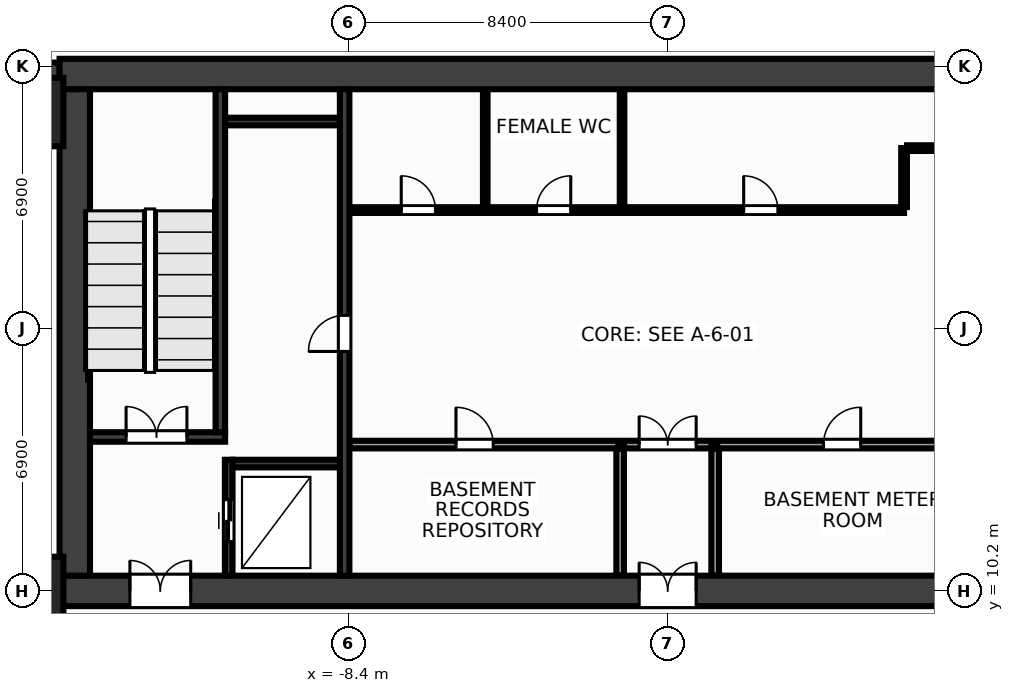
"""IFC4 building model, lengths in metres.
Left out: names, types, materials, properties, quantities, classifications, styles, units other than length and angle.
Written with IfcOpenShell. Run it as: python <this file> out.ifc"""

import sys

from ifc_helpers import new_model, si_unit, direction, frame, frame_2d, origin, origin_2d, place, context, subcontext, project, spatial, rectangle, extrude, source, transform, mapped, element, fill, save


model = new_model("IFC4")
c1 = context("Model", 3, precision=1e-05, world=origin(), true_north=direction((0.0, 1.0)))
c2 = subcontext(c1, "Body", "Model", "MODEL_VIEW")
j1 = project(units=[si_unit("LENGTHUNIT", "METRE"), si_unit("PLANEANGLEUNIT", "RADIAN")], contexts=[c1])
p1 = place(None, origin())
s1 = spatial("IfcSite", under=j1, at=p1, CompositionType="ELEMENT")
p2 = place(p1, origin())
s2 = spatial("IfcBuilding", under=s1, at=p2, CompositionType="ELEMENT")
p3 = place(p2, frame((0.0, 0.0, -11.0)))
s3 = spatial("IfcBuildingStorey", under=s2, at=p3, CompositionType="ELEMENT", Elevation=-11.0)
m1 = source(origin(), c2, "Body", "SweptSolid", [
    extrude(rectangle(XDim=22.9, YDim=0.6, at=frame_2d((11.45, 0.0))), origin(), (0.0, 0.0, 1.0), 5.5),
])
p4 = place(p3, frame((-38.9, 23.8, 0.0), z_axis=(0.0, 0.0, 1.0), x_axis=(1.0, 0.0, 0.0)))
e1 = element("IfcWall", 1, at=p4, inside=s3, PredefinedType="SHEAR", context=c2, shape_type="MappedRepresentation", body=[
    mapped(m1, transform((0.0, 0.0, 0.0), x_axis=(1.0, 0.0, 0.0), y_axis=(0.0, 1.0, 0.0), z_axis=(0.0, 0.0, 1.0), scale=1.0)),
])
m2 = source(origin(), c2, "Body", "SweptSolid", [
    extrude(rectangle(XDim=32.0, YDim=0.8, at=frame_2d((16.0, 0.0))), origin(), (0.0, 0.0, 1.0), 5.5),
])
p5 = place(p3, frame((-16.0, 23.8, 0.0), z_axis=(0.0, 0.0, 1.0), x_axis=(1.0, 0.0, 0.0)))
e2 = element("IfcWall", 2, at=p5, inside=s3, PredefinedType="SHEAR", context=c2, shape_type="MappedRepresentation", body=[
    mapped(m2, transform((0.0, 0.0, 0.0), x_axis=(1.0, 0.0, 0.0), y_axis=(0.0, 1.0, 0.0), z_axis=(0.0, 0.0, 1.0), scale=1.0)),
])
p6 = place(p3, frame((-16.0, 10.2, 0.0), z_axis=(0.0, 0.0, 1.0), x_axis=(1.0, 0.0, 0.0)))
e3 = element("IfcWall", 3, at=p6, inside=s3, PredefinedType="SHEAR", context=c2, shape_type="MappedRepresentation", body=[
    mapped(m2, transform((0.0, 0.0, 0.0), x_axis=(1.0, 0.0, 0.0), y_axis=(0.0, 1.0, 0.0), z_axis=(0.0, 0.0, 1.0), scale=1.0)),
])
p7 = place(p6, frame((1.85, 0.0, 0.0)))
e4 = element("IfcOpeningElement", 4, at=p7, cuts=e3, PredefinedType="OPENING", context=c2, shape_type="SweptSolid", body=[
    extrude(rectangle(XDim=1.6, YDim=2.15, at=frame_2d((0.8, 1.075))), frame((0.0, 0.412, 0.0), z_axis=(0.0, -1.0, 0.0), x_axis=(1.0, 0.0, 0.0)), (0.0, 0.0, 1.0), 0.824),
])
p8 = place(p6, frame((28.55, 0.0, 0.0)))
e5 = element("IfcOpeningElement", 5, at=p8, cuts=e3, PredefinedType="OPENING", context=c2, shape_type="SweptSolid", body=[
    extrude(rectangle(XDim=1.6, YDim=2.15, at=frame_2d((0.8, 1.075))), frame((0.0, 0.412, 0.0), z_axis=(0.0, -1.0, 0.0), x_axis=(1.0, 0.0, 0.0)), (0.0, 0.0, 1.0), 0.824),
])
p9 = place(p6, frame((15.25, 0.0, 0.0)))
e6 = element("IfcOpeningElement", 6, at=p9, cuts=e3, PredefinedType="OPENING", context=c2, shape_type="SweptSolid", body=[
    extrude(rectangle(XDim=1.5, YDim=2.2, at=frame_2d((0.75, 1.1))), frame((0.0, 0.412, 0.0), z_axis=(0.0, -1.0, 0.0), x_axis=(1.0, 0.0, 0.0)), (0.0, 0.0, 1.0), 0.824),
])
m3 = source(origin(), c2, "Body", "SweptSolid", [
    extrude(rectangle(XDim=12.8, YDim=0.8, at=frame_2d((6.4, 0.0))), origin(), (0.0, 0.0, 1.0), 5.5),
])
p10 = place(p3, frame((-15.6, 10.6, 0.0), z_axis=(0.0, 0.0, 1.0), x_axis=(0.0, 1.0, 0.0)))
e7 = element("IfcWall", 7, at=p10, inside=s3, PredefinedType="SHEAR", context=c2, shape_type="MappedRepresentation", body=[
    mapped(m3, transform((0.0, 0.0, 0.0), x_axis=(1.0, 0.0, 0.0), y_axis=(0.0, 1.0, 0.0), z_axis=(0.0, 0.0, 1.0), scale=1.0)),
])
m4 = source(origin(), c2, "Body", "SweptSolid", [
    extrude(rectangle(XDim=12.8, YDim=0.25, at=frame_2d((6.4, 0.0))), origin(), (0.0, 0.0, 1.0), 5.5),
])
p11 = place(p3, frame((-8.5, 10.6, 0.0), z_axis=(0.0, 0.0, 1.0), x_axis=(0.0, 1.0, 0.0)))
e8 = element("IfcWall", 8, at=p11, inside=s3, PredefinedType="SHEAR", context=c2, shape_type="MappedRepresentation", body=[
    mapped(m4, transform((0.0, 0.0, 0.0), x_axis=(1.0, 0.0, 0.0), y_axis=(0.0, 1.0, 0.0), z_axis=(0.0, 0.0, 1.0), scale=1.0)),
])
p12 = place(p11, frame((5.9, 0.0, 0.0)))
e9 = element("IfcOpeningElement", 9, at=p12, cuts=e8, PredefinedType="OPENING", context=c2, shape_type="SweptSolid", body=[
    extrude(rectangle(XDim=0.95, YDim=2.15, at=frame_2d((0.475, 1.075))), frame((0.0, 0.137, 0.0), z_axis=(0.0, -1.0, 0.0), x_axis=(1.0, 0.0, 0.0)), (0.0, 0.0, 1.0), 0.274),
])
m5 = source(origin(), c2, "Body", "SweptSolid", [
    extrude(rectangle(XDim=3.555, YDim=0.25, at=frame_2d((1.777, 0.0))), origin(), (0.0, 0.0, 1.0), 5.5),
])
p13 = place(p3, frame((-15.2, 14.25, 0.0), z_axis=(0.0, 0.0, 1.0), x_axis=(1.0, 0.0, 0.0)))
e10 = element("IfcWall", 10, at=p13, inside=s3, PredefinedType="SHEAR", context=c2, shape_type="MappedRepresentation", body=[
    mapped(m5, transform((0.0, 0.0, 0.0), x_axis=(1.0, 0.0, 0.0), y_axis=(0.0, 1.0, 0.0), z_axis=(0.0, 0.0, 1.0), scale=1.0)),
])
p14 = place(p13, frame((0.95, 0.0, 0.0)))
e11 = element("IfcOpeningElement", 11, at=p14, cuts=e10, PredefinedType="OPENING", context=c2, shape_type="SweptSolid", body=[
    extrude(rectangle(XDim=1.6, YDim=2.15, at=frame_2d((0.8, 1.075))), frame((0.0, 0.137, 0.0), z_axis=(0.0, -1.0, 0.0), x_axis=(1.0, 0.0, 0.0)), (0.0, 0.0, 1.0), 0.274),
])
m6 = source(origin(), c2, "Body", "SweptSolid", [
    extrude(rectangle(XDim=9.025, YDim=0.25, at=frame_2d((4.512, 0.0))), origin(), (0.0, 0.0, 1.0), 5.5),
])
p15 = place(p3, frame((-11.77, 14.375, 0.0), z_axis=(0.0, 0.0, 1.0), x_axis=(0.0, 1.0, 0.0)))
e12 = element("IfcWall", 12, at=p15, inside=s3, PredefinedType="SHEAR", context=c2, shape_type="MappedRepresentation", body=[
    mapped(m6, transform((0.0, 0.0, 0.0), x_axis=(1.0, 0.0, 0.0), y_axis=(0.0, 1.0, 0.0), z_axis=(0.0, 0.0, 1.0), scale=1.0)),
])
m7 = source(origin(), c2, "Body", "SweptSolid", [
    extrude(rectangle(XDim=3.05, YDim=0.2, at=frame_2d((1.525, 0.0))), origin(), (0.0, 0.0, 1.0), 5.5),
])
p16 = place(p3, frame((-11.55, 10.6, 0.0), z_axis=(0.0, 0.0, 1.0), x_axis=(0.0, 1.0, 0.0)))
e13 = element("IfcWall", 13, at=p16, inside=s3, PredefinedType="SHEAR", context=c2, shape_type="MappedRepresentation", body=[
    mapped(m7, transform((0.0, 0.0, 0.0), x_axis=(1.0, 0.0, 0.0), y_axis=(0.0, 1.0, 0.0), z_axis=(0.0, 0.0, 1.0), scale=1.0)),
])
p17 = place(p16, frame((0.9, 0.0, 0.0)))
e14 = element("IfcOpeningElement", 14, at=p17, cuts=e13, PredefinedType="OPENING", context=c2, shape_type="SweptSolid", body=[
    extrude(rectangle(XDim=1.1, YDim=2.15, at=frame_2d((0.55, 1.075))), frame((0.0, 0.112, 0.0), z_axis=(0.0, -1.0, 0.0), x_axis=(1.0, 0.0, 0.0)), (0.0, 0.0, 1.0), 0.224),
])
m8 = source(origin(), c2, "Body", "SweptSolid", [
    extrude(rectangle(XDim=2.825, YDim=0.2, at=frame_2d((1.413, 0.0))), origin(), (0.0, 0.0, 1.0), 5.5),
])
p18 = place(p3, frame((-11.45, 13.55, 0.0), z_axis=(0.0, 0.0, 1.0), x_axis=(1.0, 0.0, 0.0)))
e15 = element("IfcWall", 15, at=p18, inside=s3, PredefinedType="SHEAR", context=c2, shape_type="MappedRepresentation", body=[
    mapped(m8, transform((0.0, 0.0, 0.0), x_axis=(1.0, 0.0, 0.0), y_axis=(0.0, 1.0, 0.0), z_axis=(0.0, 0.0, 1.0), scale=1.0)),
])
m9 = source(origin(), c2, "Body", "SweptSolid", [
    extrude(rectangle(XDim=3.02, YDim=0.2, at=frame_2d((1.51, 0.0))), origin(), (0.0, 0.0, 1.0), 5.5),
])
p19 = place(p3, frame((-11.645, 22.55, 0.0), z_axis=(0.0, 0.0, 1.0), x_axis=(1.0, 0.0, 0.0)))
e16 = element("IfcWall", 16, at=p19, inside=s3, PredefinedType="SHEAR", context=c2, shape_type="MappedRepresentation", body=[
    mapped(m9, transform((0.0, 0.0, 0.0), x_axis=(1.0, 0.0, 0.0), y_axis=(0.0, 1.0, 0.0), z_axis=(0.0, 0.0, 1.0), scale=1.0)),
])
m10 = source(origin(), c2, "Body", "SweptSolid", [
    extrude(rectangle(XDim=1.8, YDim=1.8, at=origin_2d()), origin(), (0.0, 0.0, 1.0), 5.5),
])
for number, where, z_axis, x_axis in (
    (17, (-16.8, 10.2, 0.0), (0.0, 0.0, 1.0), (1.0, 0.0, 0.0)),
    (18, (-16.8, 22.8, 0.0), (0.0, 0.0, 1.0), (1.0, 0.0, 0.0)),
):
    element("IfcColumn", number, at=place(p3, frame(where, z_axis=z_axis, x_axis=x_axis)), inside=s3, PredefinedType="COLUMN", context=c2, shape_type="MappedRepresentation", body=[
        mapped(m10, transform((0.0, 0.0, 0.0), x_axis=(1.0, 0.0, 0.0), y_axis=(0.0, 1.0, 0.0), z_axis=(0.0, 0.0, 1.0), scale=1.0)),
    ])
m11 = source(origin(), c2, "Body", "SweptSolid", [
    extrude(rectangle(XDim=7.07, YDim=0.2, at=frame_2d((3.535, 0.0))), origin(), (0.0, 0.0, 1.0), 5.15),
])
p20 = place(p3, frame((-8.37, 14.05, 0.0), z_axis=(0.0, 0.0, 1.0), x_axis=(1.0, 0.0, 0.0)))
e19 = element("IfcWall", 19, at=p20, inside=s3, PredefinedType="PARTITIONING", context=c2, shape_type="MappedRepresentation", body=[
    mapped(m11, transform((0.0, 0.0, 0.0), x_axis=(1.0, 0.0, 0.0), y_axis=(0.0, 1.0, 0.0), z_axis=(0.0, 0.0, 1.0), scale=1.0)),
])
p21 = place(p20, frame((2.8, 0.0, 0.0)))
e20 = element("IfcOpeningElement", 20, at=p21, cuts=e19, PredefinedType="OPENING", context=c2, shape_type="SweptSolid", body=[
    extrude(rectangle(XDim=0.98, YDim=2.15, at=frame_2d((0.49, 1.075))), frame((0.0, 0.112, 0.0), z_axis=(0.0, -1.0, 0.0), x_axis=(1.0, 0.0, 0.0)), (0.0, 0.0, 1.0), 0.224),
])
p22 = place(p3, frame((1.3, 14.05, 0.0), z_axis=(0.0, 0.0, 1.0), x_axis=(1.0, 0.0, 0.0)))
e21 = element("IfcWall", 21, at=p22, inside=s3, PredefinedType="PARTITIONING", context=c2, shape_type="MappedRepresentation", body=[
    mapped(m11, transform((0.0, 0.0, 0.0), x_axis=(1.0, 0.0, 0.0), y_axis=(0.0, 1.0, 0.0), z_axis=(0.0, 0.0, 1.0), scale=1.0)),
])
p23 = place(p22, frame((2.8, 0.0, 0.0)))
e22 = element("IfcOpeningElement", 22, at=p23, cuts=e21, PredefinedType="OPENING", context=c2, shape_type="SweptSolid", body=[
    extrude(rectangle(XDim=0.98, YDim=2.15, at=frame_2d((0.49, 1.075))), frame((0.0, 0.112, 0.0), z_axis=(0.0, -1.0, 0.0), x_axis=(1.0, 0.0, 0.0)), (0.0, 0.0, 1.0), 0.224),
])
m12 = source(origin(), c2, "Body", "SweptSolid", [
    extrude(rectangle(XDim=3.34, YDim=0.2, at=frame_2d((1.67, 0.0))), origin(), (0.0, 0.0, 1.0), 5.15),
])
for number, where, z_axis, x_axis in (
    (23, (-1.25, 10.6, 0.0), (0.0, 0.0, 1.0), (0.0, 1.0, 0.0)),
    (24, (1.25, 10.6, 0.0), (0.0, 0.0, 1.0), (0.0, 1.0, 0.0)),
):
    element("IfcWall", number, at=place(p3, frame(where, z_axis=z_axis, x_axis=x_axis)), inside=s3, PredefinedType="PARTITIONING", context=c2, shape_type="MappedRepresentation", body=[
        mapped(m12, transform((0.0, 0.0, 0.0), x_axis=(1.0, 0.0, 0.0), y_axis=(0.0, 1.0, 0.0), z_axis=(0.0, 0.0, 1.0), scale=1.0)),
    ])
m13 = source(origin(), c2, "Body", "SweptSolid", [
    extrude(rectangle(XDim=2.3, YDim=0.2, at=frame_2d((1.15, 0.0))), origin(), (0.0, 0.0, 1.0), 5.15),
])
p24 = place(p3, frame((-1.15, 14.05, 0.0), z_axis=(0.0, 0.0, 1.0), x_axis=(1.0, 0.0, 0.0)))
e25 = element("IfcWall", 25, at=p24, inside=s3, PredefinedType="PARTITIONING", context=c2, shape_type="MappedRepresentation", body=[
    mapped(m13, transform((0.0, 0.0, 0.0), x_axis=(1.0, 0.0, 0.0), y_axis=(0.0, 1.0, 0.0), z_axis=(0.0, 0.0, 1.0), scale=1.0)),
])
p25 = place(p24, frame((0.4, 0.0, 0.0)))
e26 = element("IfcOpeningElement", 26, at=p25, cuts=e25, PredefinedType="OPENING", context=c2, shape_type="SweptSolid", body=[
    extrude(rectangle(XDim=1.5, YDim=2.2, at=frame_2d((0.75, 1.1))), frame((0.0, 0.112, 0.0), z_axis=(0.0, -1.0, 0.0), x_axis=(1.0, 0.0, 0.0)), (0.0, 0.0, 1.0), 0.224),
])
m14 = source(origin(), c2, "Body", "SweptSolid", [
    extrude(rectangle(XDim=14.59, YDim=0.15, at=frame_2d((7.295, 0.0))), origin(), (0.0, 0.0, 1.0), 5.15),
])
p26 = place(p3, frame((-8.37, 20.22, 0.0), z_axis=(0.0, 0.0, 1.0), x_axis=(1.0, 0.0, 0.0)))
e27 = element("IfcWall", 27, at=p26, inside=s3, PredefinedType="PARTITIONING", context=c2, shape_type="MappedRepresentation", body=[
    mapped(m14, transform((0.0, 0.0, 0.0), x_axis=(1.0, 0.0, 0.0), y_axis=(0.0, 1.0, 0.0), z_axis=(0.0, 0.0, 1.0), scale=1.0)),
])
p27 = place(p26, frame((1.36, 0.0, 0.0)))
e28 = element("IfcOpeningElement", 28, at=p27, cuts=e27, PredefinedType="OPENING", context=c2, shape_type="SweptSolid", body=[
    extrude(rectangle(XDim=0.9, YDim=2.15, at=frame_2d((0.45, 1.075))), frame((0.0, 0.087, 0.0), z_axis=(0.0, -1.0, 0.0), x_axis=(1.0, 0.0, 0.0)), (0.0, 0.0, 1.0), 0.174),
])
p28 = place(p26, frame((4.92, 0.0, 0.0)))
e29 = element("IfcOpeningElement", 29, at=p28, cuts=e27, PredefinedType="OPENING", context=c2, shape_type="SweptSolid", body=[
    extrude(rectangle(XDim=0.9, YDim=2.15, at=frame_2d((0.45, 1.075))), frame((0.0, 0.087, 0.0), z_axis=(0.0, -1.0, 0.0), x_axis=(1.0, 0.0, 0.0)), (0.0, 0.0, 1.0), 0.174),
])
p29 = place(p26, frame((10.37, 0.0, 0.0)))
e30 = element("IfcOpeningElement", 30, at=p29, cuts=e27, PredefinedType="OPENING", context=c2, shape_type="SweptSolid", body=[
    extrude(rectangle(XDim=0.9, YDim=2.15, at=frame_2d((0.45, 1.075))), frame((0.0, 0.087, 0.0), z_axis=(0.0, -1.0, 0.0), x_axis=(1.0, 0.0, 0.0)), (0.0, 0.0, 1.0), 0.174),
])
m15 = source(origin(), c2, "Body", "SweptSolid", [
    extrude(rectangle(XDim=1.55, YDim=0.15, at=frame_2d((0.775, 0.0))), origin(), (0.0, 0.0, 1.0), 5.15),
])
p30 = place(p3, frame((6.22, 20.3, 0.0), z_axis=(0.0, 0.0, 1.0), x_axis=(0.0, 1.0, 0.0)))
e31 = element("IfcWall", 31, at=p30, inside=s3, PredefinedType="PARTITIONING", context=c2, shape_type="MappedRepresentation", body=[
    mapped(m15, transform((0.0, 0.0, 0.0), x_axis=(1.0, 0.0, 0.0), y_axis=(0.0, 1.0, 0.0), z_axis=(0.0, 0.0, 1.0), scale=1.0)),
])
m16 = source(origin(), c2, "Body", "SweptSolid", [
    extrude(rectangle(XDim=2.07, YDim=0.15, at=frame_2d((1.035, 0.0))), origin(), (0.0, 0.0, 1.0), 5.15),
])
p31 = place(p3, frame((6.3, 21.85, 0.0), z_axis=(0.0, 0.0, 1.0), x_axis=(1.0, 0.0, 0.0)))
e32 = element("IfcWall", 32, at=p31, inside=s3, PredefinedType="PARTITIONING", context=c2, shape_type="MappedRepresentation", body=[
    mapped(m16, transform((0.0, 0.0, 0.0), x_axis=(1.0, 0.0, 0.0), y_axis=(0.0, 1.0, 0.0), z_axis=(0.0, 0.0, 1.0), scale=1.0)),
])
m17 = source(origin(), c2, "Body", "SweptSolid", [
    extrude(rectangle(XDim=3.04, YDim=0.12, at=frame_2d((1.52, 0.0))), origin(), (0.0, 0.0, 1.0), 5.15),
])
for number, where, z_axis, x_axis in (
    (33, (-4.8, 20.32, 0.0), (0.0, 0.0, 1.0), (0.0, 1.0, 0.0)),
    (34, (-1.2, 20.32, 0.0), (0.0, 0.0, 1.0), (0.0, 1.0, 0.0)),
):
    element("IfcWall", number, at=place(p3, frame(where, z_axis=z_axis, x_axis=x_axis)), inside=s3, PredefinedType="PARTITIONING", context=c2, shape_type="MappedRepresentation", body=[
        mapped(m17, transform((0.0, 0.0, 0.0), x_axis=(1.0, 0.0, 0.0), y_axis=(0.0, 1.0, 0.0), z_axis=(0.0, 0.0, 1.0), scale=1.0)),
    ])
m18 = source(origin(), c2, "Body", "SweptSolid", [
    extrude(rectangle(XDim=1.6, YDim=2.15, at=frame_2d((0.8, 1.075))), frame((0.0, 0.025, 0.0), z_axis=(0.0, -1.0, 0.0), x_axis=(1.0, 0.0, 0.0)), (0.0, 0.0, 1.0), 0.05),
])
p32 = place(p14, origin())
e35 = element("IfcDoor", 35, at=p32, inside=s3, OperationType="DOUBLE_DOOR_SINGLE_SWING", PredefinedType="DOOR", context=c2, shape_type="MappedRepresentation", body=[
    mapped(m18, transform((0.0, 0.0, 0.0), x_axis=(1.0, 0.0, 0.0), y_axis=(0.0, 1.0, 0.0), z_axis=(0.0, 0.0, 1.0), scale=1.0)),
])
fill(e11, e35)
p33 = place(p7, origin())
e36 = element("IfcDoor", 36, at=p33, inside=s3, OperationType="DOUBLE_DOOR_SINGLE_SWING", PredefinedType="DOOR", context=c2, shape_type="MappedRepresentation", body=[
    mapped(m18, transform((0.0, 0.0, 0.0), x_axis=(1.0, 0.0, 0.0), y_axis=(0.0, 1.0, 0.0), z_axis=(0.0, 0.0, 1.0), scale=1.0)),
])
fill(e4, e36)
m19 = source(origin(), c2, "Body", "SweptSolid", [
    extrude(rectangle(XDim=1.1, YDim=2.15, at=frame_2d((0.55, 1.075))), frame((0.0, 0.025, 0.0), z_axis=(0.0, -1.0, 0.0), x_axis=(1.0, 0.0, 0.0)), (0.0, 0.0, 1.0), 0.05),
])
p34 = place(p17, origin())
e37 = element("IfcDoor", 37, at=p34, inside=s3, OperationType="DOUBLE_DOOR_SLIDING", PredefinedType="DOOR", context=c2, shape_type="MappedRepresentation", body=[
    mapped(m19, transform((0.0, 0.0, 0.0), x_axis=(1.0, 0.0, 0.0), y_axis=(0.0, 1.0, 0.0), z_axis=(0.0, 0.0, 1.0), scale=1.0)),
])
fill(e14, e37)
m20 = source(origin(), c2, "Body", "SweptSolid", [
    extrude(rectangle(XDim=0.95, YDim=2.15, at=frame_2d((0.475, 1.075))), frame((0.0, 0.025, 0.0), z_axis=(0.0, -1.0, 0.0), x_axis=(1.0, 0.0, 0.0)), (0.0, 0.0, 1.0), 0.05),
])
p35 = place(p12, origin())
e38 = element("IfcDoor", 38, at=p35, inside=s3, OperationType="SINGLE_SWING_LEFT", PredefinedType="DOOR", context=c2, shape_type="MappedRepresentation", body=[
    mapped(m20, transform((0.0, 0.0, 0.0), x_axis=(1.0, 0.0, 0.0), y_axis=(0.0, 1.0, 0.0), z_axis=(0.0, 0.0, 1.0), scale=1.0)),
])
fill(e9, e38)
m21 = source(origin(), c2, "Body", "SweptSolid", [
    extrude(rectangle(XDim=0.98, YDim=2.15, at=frame_2d((0.49, 1.075))), frame((0.0, 0.025, 0.0), z_axis=(0.0, -1.0, 0.0), x_axis=(1.0, 0.0, 0.0)), (0.0, 0.0, 1.0), 0.05),
])
p36 = place(p21, origin())
e39 = element("IfcDoor", 39, at=p36, inside=s3, OperationType="SINGLE_SWING_LEFT", PredefinedType="DOOR", context=c2, shape_type="MappedRepresentation", body=[
    mapped(m21, transform((0.0, 0.0, 0.0), x_axis=(1.0, 0.0, 0.0), y_axis=(0.0, 1.0, 0.0), z_axis=(0.0, 0.0, 1.0), scale=1.0)),
])
fill(e20, e39)
p37 = place(p23, origin())
e40 = element("IfcDoor", 40, at=p37, inside=s3, OperationType="SINGLE_SWING_RIGHT", PredefinedType="DOOR", context=c2, shape_type="MappedRepresentation", body=[
    mapped(m21, transform((0.0, 0.0, 0.0), x_axis=(1.0, 0.0, 0.0), y_axis=(0.0, 1.0, 0.0), z_axis=(0.0, 0.0, 1.0), scale=1.0)),
])
fill(e22, e40)
m22 = source(origin(), c2, "Body", "SweptSolid", [
    extrude(rectangle(XDim=1.5, YDim=2.2, at=frame_2d((0.75, 1.1))), frame((0.0, 0.025, 0.0), z_axis=(0.0, -1.0, 0.0), x_axis=(1.0, 0.0, 0.0)), (0.0, 0.0, 1.0), 0.05),
])
p38 = place(p25, origin())
e41 = element("IfcDoor", 41, at=p38, inside=s3, OperationType="DOUBLE_DOOR_SINGLE_SWING", PredefinedType="DOOR", context=c2, shape_type="MappedRepresentation", body=[
    mapped(m22, transform((0.0, 0.0, 0.0), x_axis=(1.0, 0.0, 0.0), y_axis=(0.0, 1.0, 0.0), z_axis=(0.0, 0.0, 1.0), scale=1.0)),
])
fill(e26, e41)
p39 = place(p9, origin())
e42 = element("IfcDoor", 42, at=p39, inside=s3, OperationType="DOUBLE_DOOR_SINGLE_SWING", PredefinedType="DOOR", context=c2, shape_type="MappedRepresentation", body=[
    mapped(m22, transform((0.0, 0.0, 0.0), x_axis=(1.0, 0.0, 0.0), y_axis=(0.0, 1.0, 0.0), z_axis=(0.0, 0.0, 1.0), scale=1.0)),
])
fill(e6, e42)
m23 = source(origin(), c2, "Body", "SweptSolid", [
    extrude(rectangle(XDim=0.9, YDim=2.15, at=frame_2d((0.45, 1.075))), frame((0.0, 0.025, 0.0), z_axis=(0.0, -1.0, 0.0), x_axis=(1.0, 0.0, 0.0)), (0.0, 0.0, 1.0), 0.05),
])
p40 = place(p27, origin())
e43 = element("IfcDoor", 43, at=p40, inside=s3, OperationType="SINGLE_SWING_LEFT", PredefinedType="DOOR", context=c2, shape_type="MappedRepresentation", body=[
    mapped(m23, transform((0.0, 0.0, 0.0), x_axis=(1.0, 0.0, 0.0), y_axis=(0.0, 1.0, 0.0), z_axis=(0.0, 0.0, 1.0), scale=1.0)),
])
fill(e28, e43)
p41 = place(p28, origin())
e44 = element("IfcDoor", 44, at=p41, inside=s3, OperationType="SINGLE_SWING_RIGHT", PredefinedType="DOOR", context=c2, shape_type="MappedRepresentation", body=[
    mapped(m23, transform((0.0, 0.0, 0.0), x_axis=(1.0, 0.0, 0.0), y_axis=(0.0, 1.0, 0.0), z_axis=(0.0, 0.0, 1.0), scale=1.0)),
])
fill(e29, e44)
p42 = place(p29, origin())
e45 = element("IfcDoor", 45, at=p42, inside=s3, OperationType="SINGLE_SWING_LEFT", PredefinedType="DOOR", context=c2, shape_type="MappedRepresentation", body=[
    mapped(m23, transform((0.0, 0.0, 0.0), x_axis=(1.0, 0.0, 0.0), y_axis=(0.0, 1.0, 0.0), z_axis=(0.0, 0.0, 1.0), scale=1.0)),
])
fill(e30, e45)
save(model, sys.argv[1])
